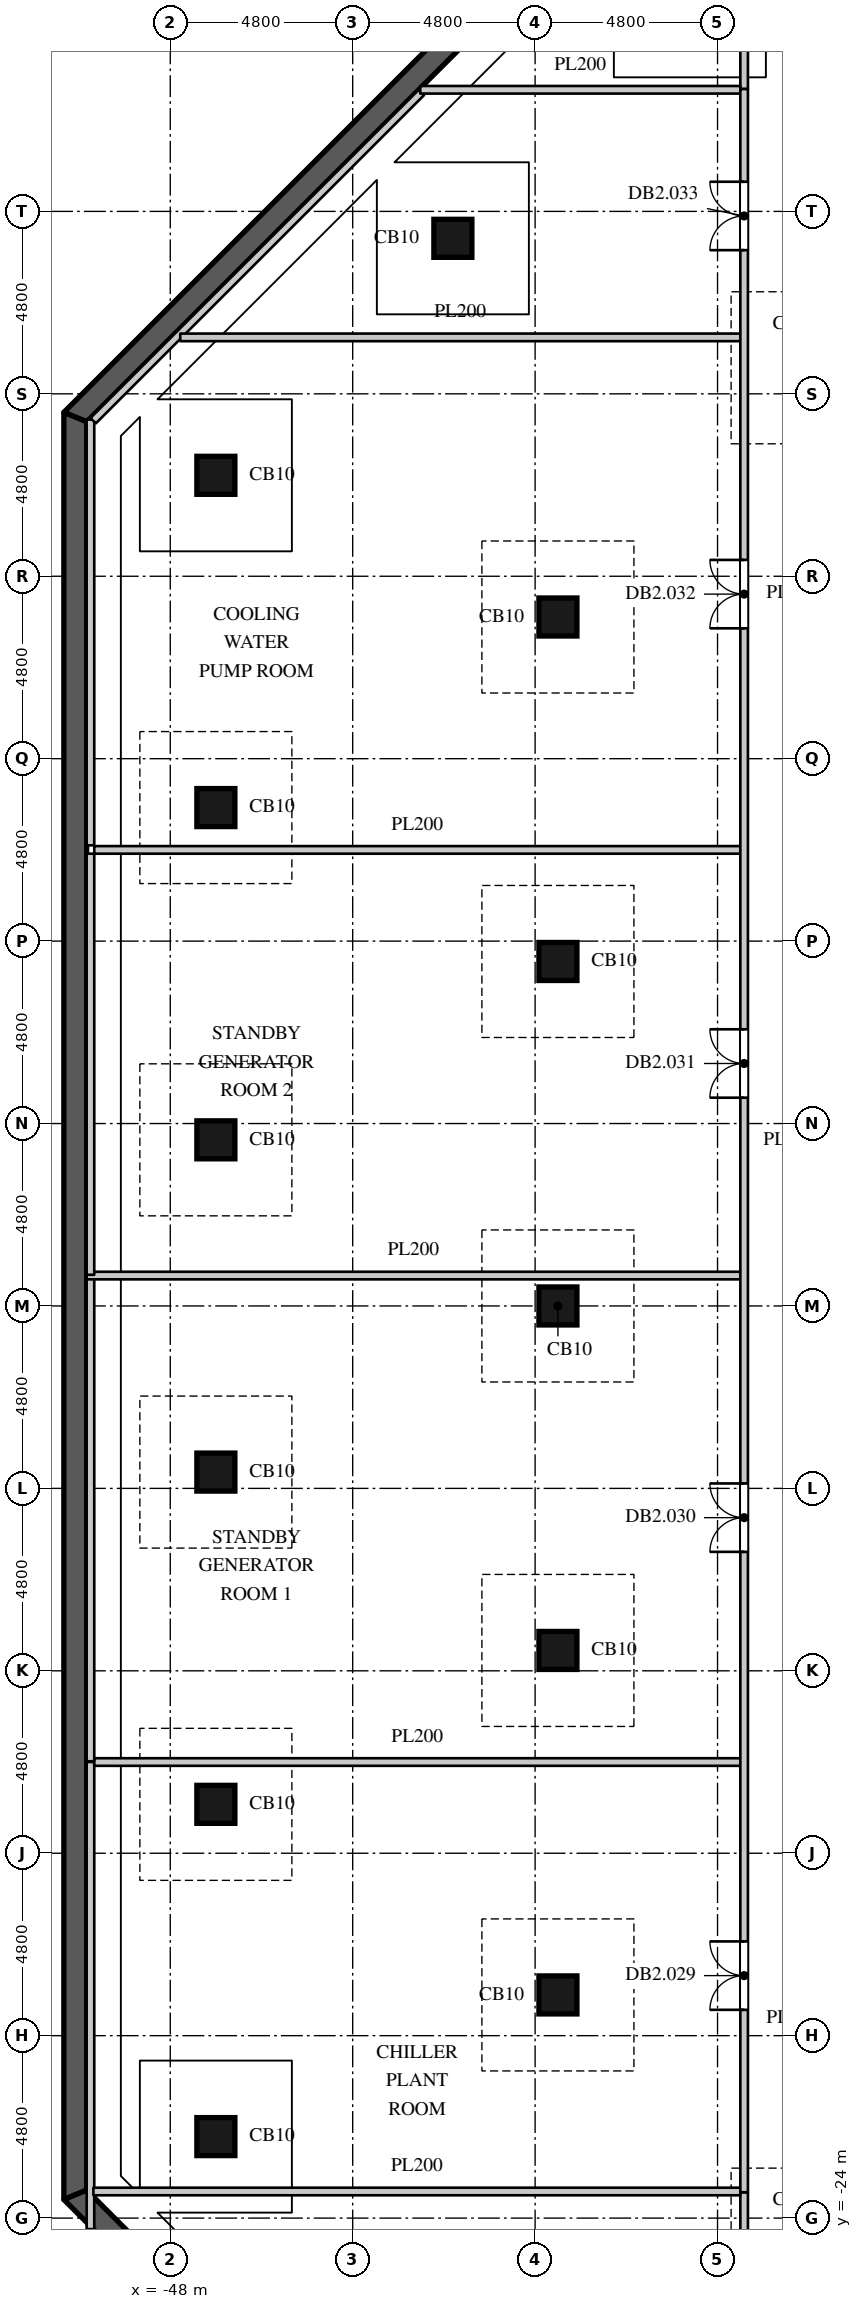
"""IFC4 building model, lengths in metres.
Left out: names, types, materials, properties, quantities, classifications, styles, units other than length and angle.
Written with IfcOpenShell. Run it as: python <this file> out.ifc"""

import sys

from ifc_helpers import new_model, si_unit, direction, frame, frame_2d, origin, origin_2d, place, context, subcontext, project, spatial, polyline, rectangle, outline, extrude, element, fill, save


model = new_model("IFC4")
c1 = context("Model", 3, precision=1e-05, world=origin(), true_north=direction((0.0, 1.0)))
c2 = subcontext(c1, "Body", "Model", "MODEL_VIEW")
j1 = project(units=[si_unit("LENGTHUNIT", "METRE"), si_unit("PLANEANGLEUNIT", "RADIAN")], contexts=[c1])
p1 = place(None, origin())
s1 = spatial("IfcSite", under=j1, at=p1, CompositionType="ELEMENT")
p2 = place(p1, origin())
s2 = spatial("IfcBuilding", under=s1, at=p2, CompositionType="ELEMENT")
p3 = place(p2, frame((0.0, 0.0, -9.0)))
s3 = spatial("IfcBuildingStorey", under=s2, at=p3, CompositionType="ELEMENT", Elevation=-9.0)
p4 = place(p3, origin())
e1 = element("IfcWall", 1, at=p4, inside=s3, PredefinedType="SOLIDWALL", context=c2, shape_type="SweptSolid", body=[
    extrude(outline(polyline([(-23.513, 50.8), (-50.8, 23.513), (-50.2, 23.264), (-23.264, 50.2), (-23.513, 50.8)])), origin(), (0.0, 0.0, 1.0), 4.5),
])
p5 = place(p3, origin())
e2 = element("IfcWall", 2, at=p5, inside=s3, PredefinedType="SOLIDWALL", context=c2, shape_type="SweptSolid", body=[
    extrude(outline(polyline([(-50.8, 23.513), (-50.8, -23.513), (-50.2, -23.264), (-50.2, 23.264), (-50.8, 23.513)])), origin(), (0.0, 0.0, 1.0), 4.5),
])
p6 = place(p3, origin())
e3 = element("IfcWall", 3, at=p6, inside=s3, PredefinedType="SOLIDWALL", context=c2, shape_type="SweptSolid", body=[
    extrude(outline(polyline([(-50.8, -23.513), (-23.513, -50.8), (-23.264, -50.2), (-50.2, -23.264), (-50.8, -23.513)])), origin(), (0.0, 0.0, 1.0), 4.5),
])
for number, where, z_axis, x_axis in (
    (4, (-46.8, -21.856, 0.0), (0.0, 0.0, 1.0), (1.0, 0.0, 0.0)),
    (5, (-37.8, -18.128, 0.0), (0.0, 0.0, 1.0), (1.0, 0.0, 0.0)),
    (6, (-46.8, -13.114, 0.0), (0.0, 0.0, 1.0), (1.0, 0.0, 0.0)),
    (7, (-37.8, -9.064, 0.0), (0.0, 0.0, 1.0), (1.0, 0.0, 0.0)),
    (8, (-46.8, -4.371, 0.0), (0.0, 0.0, 1.0), (1.0, 0.0, 0.0)),
    (9, (-37.8, 0.0, 0.0), (0.0, 0.0, 1.0), (1.0, 0.0, 0.0)),
    (10, (-46.8, 4.371, 0.0), (0.0, 0.0, 1.0), (1.0, 0.0, 0.0)),
    (11, (-37.8, 9.064, 0.0), (0.0, 0.0, 1.0), (1.0, 0.0, 0.0)),
    (12, (-46.8, 13.114, 0.0), (0.0, 0.0, 1.0), (1.0, 0.0, 0.0)),
    (13, (-37.8, 18.128, 0.0), (0.0, 0.0, 1.0), (1.0, 0.0, 0.0)),
    (14, (-46.8, 21.856, 0.0), (0.0, 0.0, 1.0), (1.0, 0.0, 0.0)),
    (15, (-40.564, 28.092, 0.0), (0.0, 0.0, 1.0), (1.0, 0.0, 0.0)),
):
    element("IfcColumn", number, at=place(p3, frame(where, z_axis=z_axis, x_axis=x_axis)), inside=s3, PredefinedType="COLUMN", context=c2, shape_type="SweptSolid", body=[
        extrude(rectangle(XDim=1.0, YDim=1.0, at=origin_2d()), origin(), (0.0, 0.0, 1.0), 4.5),
    ])
p7 = place(p3, frame((-32.9, -35.9, 0.0), z_axis=(0.0, 0.0, 1.0), x_axis=(0.0, 1.0, 0.0)))
e16 = element("IfcWall", 16, at=p7, inside=s3, PredefinedType="PARTITIONING", context=c2, shape_type="SweptSolid", body=[
    extrude(rectangle(XDim=12.58, YDim=0.2, at=frame_2d((6.29, 0.0))), origin(), (0.0, 0.0, 1.0), 4.048),
])
p8 = place(p3, frame((-32.9, 32.02, 0.0), z_axis=(0.0, 0.0, 1.0), x_axis=(0.0, 1.0, 0.0)))
e17 = element("IfcWall", 17, at=p8, inside=s3, PredefinedType="PARTITIONING", context=c2, shape_type="SweptSolid", body=[
    extrude(rectangle(XDim=3.88, YDim=0.2, at=frame_2d((1.94, 0.0))), origin(), (0.0, 0.0, 1.0), 4.048),
])
p9 = place(p3, frame((-50.1, -24.291, 0.0), z_axis=(0.0, 0.0, 1.0), x_axis=(0.0, 1.0, 0.0)))
e18 = element("IfcWall", 18, at=p9, inside=s3, PredefinedType="PARTITIONING", context=c2, shape_type="SweptSolid", body=[
    extrude(rectangle(XDim=12.291, YDim=0.2, at=frame_2d((6.145, 0.0))), origin(), (0.0, 0.0, 1.0), 4.048),
])
p10 = place(p3, frame((-50.0, -12.0, 0.0), z_axis=(0.0, 0.0, 1.0), x_axis=(1.0, 0.0, 0.0)))
e19 = element("IfcWall", 19, at=p10, inside=s3, PredefinedType="PARTITIONING", context=c2, shape_type="SweptSolid", body=[
    extrude(rectangle(XDim=17.0, YDim=0.2, at=frame_2d((8.5, 0.0))), origin(), (0.0, 0.0, 1.0), 4.048),
])
p11 = place(p3, frame((-50.1, -11.98, 0.0), z_axis=(0.0, 0.0, 1.0), x_axis=(0.0, 1.0, 0.0)))
e20 = element("IfcWall", 20, at=p11, inside=s3, PredefinedType="PARTITIONING", context=c2, shape_type="SweptSolid", body=[
    extrude(rectangle(XDim=12.78, YDim=0.2, at=frame_2d((6.39, 0.0))), origin(), (0.0, 0.0, 1.0), 4.048),
])
p12 = place(p3, frame((-50.2, 0.8, 0.0), z_axis=(0.0, 0.0, 1.0), x_axis=(1.0, 0.0, 0.0)))
e21 = element("IfcWall", 21, at=p12, inside=s3, PredefinedType="PARTITIONING", context=c2, shape_type="SweptSolid", body=[
    extrude(rectangle(XDim=17.2, YDim=0.2, at=frame_2d((8.6, 0.0))), origin(), (0.0, 0.0, 1.0), 4.048),
])
p13 = place(p3, frame((-50.1, 0.82, 0.0), z_axis=(0.0, 0.0, 1.0), x_axis=(0.0, 1.0, 0.0)))
e22 = element("IfcWall", 22, at=p13, inside=s3, PredefinedType="PARTITIONING", context=c2, shape_type="SweptSolid", body=[
    extrude(rectangle(XDim=11.08, YDim=0.2, at=frame_2d((5.54, 0.0))), origin(), (0.0, 0.0, 1.0), 4.048),
])
p14 = place(p3, frame((-50.0, 12.0, 0.0), z_axis=(0.0, 0.0, 1.0), x_axis=(1.0, 0.0, 0.0)))
e23 = element("IfcWall", 23, at=p14, inside=s3, PredefinedType="PARTITIONING", context=c2, shape_type="SweptSolid", body=[
    extrude(rectangle(XDim=17.0, YDim=0.2, at=frame_2d((8.5, 0.0))), origin(), (0.0, 0.0, 1.0), 4.048),
])
p15 = place(p3, frame((-50.1, 12.12, 0.0), z_axis=(0.0, 0.0, 1.0), x_axis=(0.0, 1.0, 0.0)))
e24 = element("IfcWall", 24, at=p15, inside=s3, PredefinedType="PARTITIONING", context=c2, shape_type="SweptSolid", body=[
    extrude(rectangle(XDim=11.203, YDim=0.2, at=frame_2d((5.601, 0.0))), origin(), (0.0, 0.0, 1.0), 4.048),
])
p16 = place(p3, frame((-50.029, 23.293, 0.0), z_axis=(0.0, 0.0, 1.0), x_axis=(0.707106781187, 0.707106781187, 0.0)))
e25 = element("IfcWall", 25, at=p16, inside=s3, PredefinedType="PARTITIONING", context=c2, shape_type="SweptSolid", body=[
    extrude(rectangle(XDim=12.213, YDim=0.2, at=frame_2d((6.106, 0.0))), origin(), (0.0, 0.0, 1.0), 4.048),
])
p17 = place(p3, frame((-50.023, -23.3, 0.0), z_axis=(0.0, 0.0, 1.0), x_axis=(1.0, 0.0, 0.0)))
e26 = element("IfcWall", 26, at=p17, inside=s3, PredefinedType="PARTITIONING", context=c2, shape_type="SweptSolid", body=[
    extrude(rectangle(XDim=17.023, YDim=0.2, at=frame_2d((8.511, 0.0))), origin(), (0.0, 0.0, 1.0), 4.048),
])
p18 = place(p3, frame((-47.738, 25.485, 0.0), z_axis=(0.0, 0.0, 1.0), x_axis=(1.0, 0.0, 0.0)))
e27 = element("IfcWall", 27, at=p18, inside=s3, PredefinedType="PARTITIONING", context=c2, shape_type="SweptSolid", body=[
    extrude(rectangle(XDim=14.738, YDim=0.2, at=frame_2d((7.369, 0.0))), origin(), (0.0, 0.0, 1.0), 4.048),
])
p19 = place(p3, frame((-41.423, 32.0, 0.0), z_axis=(0.0, 0.0, 1.0), x_axis=(1.0, 0.0, 0.0)))
e28 = element("IfcWall", 28, at=p19, inside=s3, PredefinedType="PARTITIONING", context=c2, shape_type="SweptSolid", body=[
    extrude(rectangle(XDim=8.423, YDim=0.2, at=frame_2d((4.211, 0.0))), origin(), (0.0, 0.0, 1.0), 4.048),
])
p20 = place(p3, frame((-32.9, -23.32, 0.0), z_axis=(0.0, 0.0, 1.0), x_axis=(0.0, 1.0, 0.0)))
e29 = element("IfcWall", 29, at=p20, inside=s3, PredefinedType="PARTITIONING", context=c2, shape_type="SweptSolid", body=[
    extrude(rectangle(XDim=55.34, YDim=0.2, at=frame_2d((27.67, 0.0))), origin(), (0.0, 0.0, 1.0), 4.048),
])
p21 = place(p20, frame((4.8, 0.0, 0.0)))
e30 = element("IfcOpeningElement", 30, at=p21, cuts=e29, PredefinedType="OPENING", context=c2, shape_type="SweptSolid", body=[
    extrude(rectangle(XDim=1.8, YDim=2.4, at=frame_2d((0.9, 1.2))), frame((0.0, 0.11, 0.0), z_axis=(0.0, -1.0, 0.0), x_axis=(1.0, 0.0, 0.0)), (0.0, 0.0, 1.0), 0.22),
])
p22 = place(p20, frame((16.85, 0.0, 0.0)))
e31 = element("IfcOpeningElement", 31, at=p22, cuts=e29, PredefinedType="OPENING", context=c2, shape_type="SweptSolid", body=[
    extrude(rectangle(XDim=1.8, YDim=2.4, at=frame_2d((0.9, 1.2))), frame((0.0, 0.11, 0.0), z_axis=(0.0, -1.0, 0.0), x_axis=(1.0, 0.0, 0.0)), (0.0, 0.0, 1.0), 0.22),
])
p23 = place(p20, frame((28.8, 0.0, 0.0)))
e32 = element("IfcOpeningElement", 32, at=p23, cuts=e29, PredefinedType="OPENING", context=c2, shape_type="SweptSolid", body=[
    extrude(rectangle(XDim=1.8, YDim=2.4, at=frame_2d((0.9, 1.2))), frame((0.0, 0.11, 0.0), z_axis=(0.0, -1.0, 0.0), x_axis=(1.0, 0.0, 0.0)), (0.0, 0.0, 1.0), 0.22),
])
p24 = place(p20, frame((41.15, 0.0, 0.0)))
e33 = element("IfcOpeningElement", 33, at=p24, cuts=e29, PredefinedType="OPENING", context=c2, shape_type="SweptSolid", body=[
    extrude(rectangle(XDim=1.8, YDim=2.4, at=frame_2d((0.9, 1.2))), frame((0.0, 0.11, 0.0), z_axis=(0.0, -1.0, 0.0), x_axis=(1.0, 0.0, 0.0)), (0.0, 0.0, 1.0), 0.22),
])
p25 = place(p20, frame((51.1, 0.0, 0.0)))
e34 = element("IfcOpeningElement", 34, at=p25, cuts=e29, PredefinedType="OPENING", context=c2, shape_type="SweptSolid", body=[
    extrude(rectangle(XDim=1.8, YDim=2.4, at=frame_2d((0.9, 1.2))), frame((0.0, 0.11, 0.0), z_axis=(0.0, -1.0, 0.0), x_axis=(1.0, 0.0, 0.0)), (0.0, 0.0, 1.0), 0.22),
])
p26 = place(p21, origin())
e35 = element("IfcDoor", 35, at=p26, inside=s3, OperationType="DOUBLE_DOOR_SINGLE_SWING", PredefinedType="DOOR", context=c2, shape_type="SweptSolid", body=[
    extrude(rectangle(XDim=1.8, YDim=2.4, at=frame_2d((0.9, 1.2))), frame((0.0, 0.025, 0.0), z_axis=(0.0, -1.0, 0.0), x_axis=(1.0, 0.0, 0.0)), (0.0, 0.0, 1.0), 0.05),
])
fill(e30, e35)
p27 = place(p22, origin())
e36 = element("IfcDoor", 36, at=p27, inside=s3, OperationType="DOUBLE_DOOR_SINGLE_SWING", PredefinedType="DOOR", context=c2, shape_type="SweptSolid", body=[
    extrude(rectangle(XDim=1.8, YDim=2.4, at=frame_2d((0.9, 1.2))), frame((0.0, 0.025, 0.0), z_axis=(0.0, -1.0, 0.0), x_axis=(1.0, 0.0, 0.0)), (0.0, 0.0, 1.0), 0.05),
])
fill(e31, e36)
p28 = place(p23, origin())
e37 = element("IfcDoor", 37, at=p28, inside=s3, OperationType="DOUBLE_DOOR_SINGLE_SWING", PredefinedType="DOOR", context=c2, shape_type="SweptSolid", body=[
    extrude(rectangle(XDim=1.8, YDim=2.4, at=frame_2d((0.9, 1.2))), frame((0.0, 0.025, 0.0), z_axis=(0.0, -1.0, 0.0), x_axis=(1.0, 0.0, 0.0)), (0.0, 0.0, 1.0), 0.05),
])
fill(e32, e37)
p29 = place(p24, origin())
e38 = element("IfcDoor", 38, at=p29, inside=s3, OperationType="DOUBLE_DOOR_SINGLE_SWING", PredefinedType="DOOR", context=c2, shape_type="SweptSolid", body=[
    extrude(rectangle(XDim=1.8, YDim=2.4, at=frame_2d((0.9, 1.2))), frame((0.0, 0.025, 0.0), z_axis=(0.0, -1.0, 0.0), x_axis=(1.0, 0.0, 0.0)), (0.0, 0.0, 1.0), 0.05),
])
fill(e33, e38)
p30 = place(p25, origin())
e39 = element("IfcDoor", 39, at=p30, inside=s3, OperationType="DOUBLE_DOOR_SINGLE_SWING", PredefinedType="DOOR", context=c2, shape_type="SweptSolid", body=[
    extrude(rectangle(XDim=1.8, YDim=2.4, at=frame_2d((0.9, 1.2))), frame((0.0, 0.025, 0.0), z_axis=(0.0, -1.0, 0.0), x_axis=(1.0, 0.0, 0.0)), (0.0, 0.0, 1.0), 0.05),
])
fill(e34, e39)
save(model, sys.argv[1])
